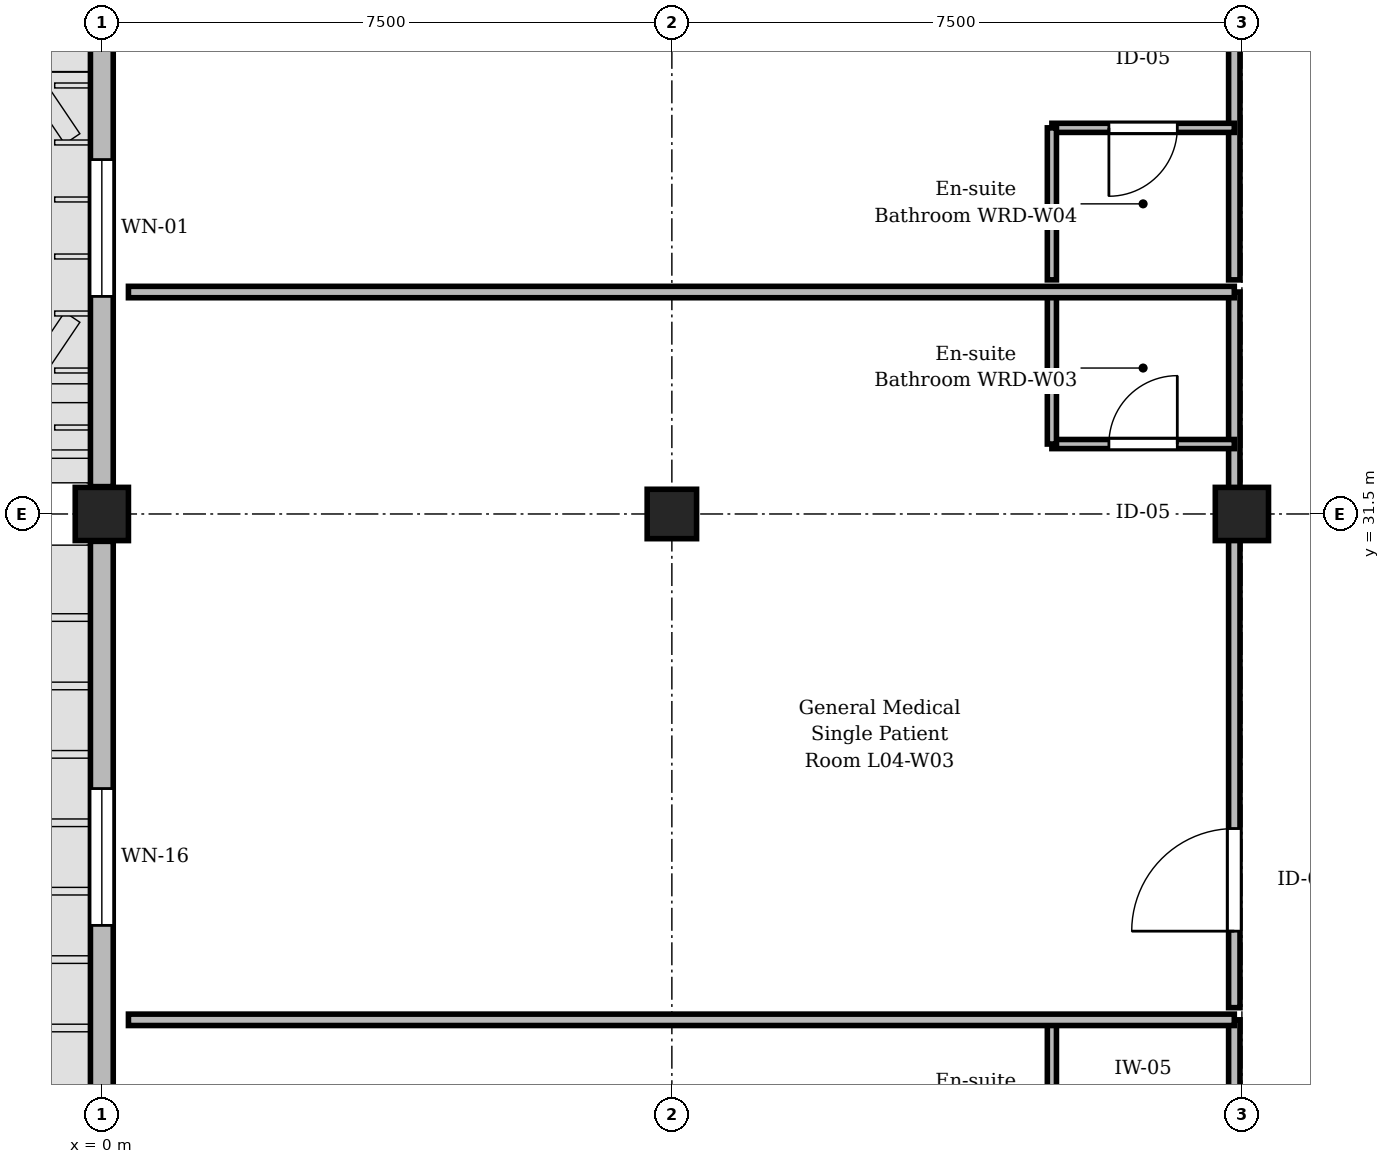
"""IFC4 building model, lengths in metres.
Left out: names, types, materials, properties, quantities, classifications, styles, units other than length and angle.
Written with IfcOpenShell. Run it as: python <this file> out.ifc"""

import sys

from ifc_helpers import new_model, si_unit, direction, frame, frame_2d, origin, origin_2d, place, context, subcontext, project, spatial, rectangle, extrude, element, fill, save


model = new_model("IFC4")
c1 = context("Model", 3, precision=1e-05, world=origin(), true_north=direction((0.0, 1.0)))
c2 = subcontext(c1, "Body", "Model", "MODEL_VIEW")
j1 = project(units=[si_unit("LENGTHUNIT", "METRE"), si_unit("PLANEANGLEUNIT", "RADIAN")], contexts=[c1])
p1 = place(None, origin())
s1 = spatial("IfcSite", under=j1, at=p1, CompositionType="ELEMENT")
p2 = place(p1, origin())
s2 = spatial("IfcBuilding", under=s1, at=p2, CompositionType="ELEMENT")
p3 = place(p2, frame((0.0, 0.0, 17.85)))
s3 = spatial("IfcBuildingStorey", under=s2, at=p3, CompositionType="ELEMENT", Elevation=17.85)
p4 = place(p3, frame((0.0, 31.5, 0.0), z_axis=(0.0, 0.0, 1.0), x_axis=(1.0, 0.0, 0.0)))
e1 = element("IfcColumn", 1, at=p4, inside=s3, PredefinedType="COLUMN", context=c2, shape_type="SweptSolid", body=[
    extrude(rectangle(XDim=0.7, YDim=0.7, at=origin_2d()), origin(), (0.0, 0.0, 1.0), 4.05),
])
p5 = place(p3, frame((7.5, 31.5, 0.0), z_axis=(0.0, 0.0, 1.0), x_axis=(1.0, 0.0, 0.0)))
e2 = element("IfcColumn", 2, at=p5, inside=s3, PredefinedType="COLUMN", context=c2, shape_type="SweptSolid", body=[
    extrude(rectangle(XDim=0.65, YDim=0.65, at=origin_2d()), origin(), (0.0, 0.0, 1.0), 4.05),
])
p6 = place(p3, frame((15.0, 31.5, 0.0), z_axis=(0.0, 0.0, 1.0), x_axis=(1.0, 0.0, 0.0)))
e3 = element("IfcColumn", 3, at=p6, inside=s3, PredefinedType="COLUMN", context=c2, shape_type="SweptSolid", body=[
    extrude(rectangle(XDim=0.7, YDim=0.7, at=origin_2d()), origin(), (0.0, 0.0, 1.0), 4.05),
])
p7 = place(p3, frame((0.0, 22.835, 0.0), z_axis=(0.0, 0.0, 1.0), x_axis=(0.0, 1.0, 0.0)))
e4 = element("IfcWall", 4, at=p7, inside=s3, PredefinedType="STANDARD", context=c2, shape_type="SweptSolid", body=[
    extrude(rectangle(XDim=8.305, YDim=0.3, at=frame_2d((4.152, 0.0))), origin(), (0.0, 0.0, 1.0), 3.22),
])
p8 = place(p7, frame((3.252, 0.0, 0.9)))
e5 = element("IfcOpeningElement", 5, at=p8, cuts=e4, PredefinedType="OPENING", context=c2, shape_type="SweptSolid", body=[
    extrude(rectangle(XDim=1.8, YDim=1.8, at=frame_2d((0.9, 0.9))), frame((0.0, 0.16, 0.0), z_axis=(0.0, -1.0, 0.0), x_axis=(1.0, 0.0, 0.0)), (0.0, 0.0, 1.0), 0.32),
])
p9 = place(p3, frame((0.0, 31.86, 0.0), z_axis=(0.0, 0.0, 1.0), x_axis=(0.0, 1.0, 0.0)))
e6 = element("IfcWall", 6, at=p9, inside=s3, PredefinedType="STANDARD", context=c2, shape_type="SweptSolid", body=[
    extrude(rectangle(XDim=6.805, YDim=0.3, at=frame_2d((3.402, 0.0))), origin(), (0.0, 0.0, 1.0), 3.17),
])
p10 = place(p9, frame((2.502, 0.0, 0.9)))
e7 = element("IfcOpeningElement", 7, at=p10, cuts=e6, PredefinedType="OPENING", context=c2, shape_type="SweptSolid", body=[
    extrude(rectangle(XDim=1.8, YDim=1.99, at=frame_2d((0.9, 0.995))), frame((0.0, 0.16, 0.0), z_axis=(0.0, -1.0, 0.0), x_axis=(1.0, 0.0, 0.0)), (0.0, 0.0, 1.0), 0.32),
])
p11 = place(p3, frame((14.9, 15.43, 0.0), z_axis=(0.0, 0.0, 1.0), x_axis=(0.0, 1.0, 0.0)))
e8 = element("IfcWall", 8, at=p11, inside=s3, PredefinedType="PARTITIONING", context=c2, shape_type="SweptSolid", body=[
    extrude(rectangle(XDim=9.415, YDim=0.15, at=frame_2d((4.708, 0.0))), origin(), (0.0, 0.0, 1.0), 3.055),
])
p12 = place(p11, frame((2.49, 0.0, 0.0)))
e9 = element("IfcOpeningElement", 9, at=p12, cuts=e8, PredefinedType="OPENING", context=c2, shape_type="SweptSolid", body=[
    extrude(rectangle(XDim=1.45, YDim=2.3, at=frame_2d((0.725, 1.15))), frame((0.0, 0.085, 0.0), z_axis=(0.0, -1.0, 0.0), x_axis=(1.0, 0.0, 0.0)), (0.0, 0.0, 1.0), 0.17),
])
p13 = place(p3, frame((12.5, 22.845, 0.0), z_axis=(0.0, 0.0, 1.0), x_axis=(0.0, 1.0, 0.0)))
e10 = element("IfcWall", 10, at=p13, inside=s3, PredefinedType="PARTITIONING", context=c2, shape_type="SweptSolid", body=[
    extrude(rectangle(XDim=2.0, YDim=0.12, at=frame_2d((1.0, 0.0))), origin(), (0.0, 0.0, 1.0), 3.755),
])
p14 = place(p3, frame((14.9, 25.005, 0.0), z_axis=(0.0, 0.0, 1.0), x_axis=(0.0, 1.0, 0.0)))
e11 = element("IfcWall", 11, at=p14, inside=s3, PredefinedType="PARTITIONING", context=c2, shape_type="SweptSolid", body=[
    extrude(rectangle(XDim=9.415, YDim=0.15, at=frame_2d((4.708, 0.0))), origin(), (0.0, 0.0, 1.0), 3.055),
])
p15 = place(p14, frame((1.007, 0.0, 0.0)))
e12 = element("IfcOpeningElement", 12, at=p15, cuts=e11, PredefinedType="OPENING", context=c2, shape_type="SweptSolid", body=[
    extrude(rectangle(XDim=1.35, YDim=2.25, at=frame_2d((0.675, 1.125))), frame((0.0, 0.085, 0.0), z_axis=(0.0, -1.0, 0.0), x_axis=(1.0, 0.0, 0.0)), (0.0, 0.0, 1.0), 0.17),
])
p16 = place(p3, frame((12.5, 32.42, 0.0), z_axis=(0.0, 0.0, 1.0), x_axis=(1.0, 0.0, 0.0)))
e13 = element("IfcWall", 13, at=p16, inside=s3, PredefinedType="PARTITIONING", context=c2, shape_type="SweptSolid", body=[
    extrude(rectangle(XDim=2.4, YDim=0.12, at=frame_2d((1.2, 0.0))), origin(), (0.0, 0.0, 1.0), 3.755),
])
p17 = place(p16, frame((0.75, 0.0, 0.0)))
e14 = element("IfcOpeningElement", 14, at=p17, cuts=e13, PredefinedType="OPENING", context=c2, shape_type="SweptSolid", body=[
    extrude(rectangle(XDim=0.9, YDim=2.1, at=frame_2d((0.45, 1.05))), frame((0.0, 0.07, 0.0), z_axis=(0.0, -1.0, 0.0), x_axis=(1.0, 0.0, 0.0)), (0.0, 0.0, 1.0), 0.14),
])
p18 = place(p3, frame((12.5, 32.42, 0.0), z_axis=(0.0, 0.0, 1.0), x_axis=(0.0, 1.0, 0.0)))
e15 = element("IfcWall", 15, at=p18, inside=s3, PredefinedType="PARTITIONING", context=c2, shape_type="SweptSolid", body=[
    extrude(rectangle(XDim=2.0, YDim=0.12, at=frame_2d((1.0, 0.0))), origin(), (0.0, 0.0, 1.0), 3.755),
])
p19 = place(p3, frame((14.9, 34.58, 0.0), z_axis=(0.0, 0.0, 1.0), x_axis=(0.0, 1.0, 0.0)))
e16 = element("IfcWall", 16, at=p19, inside=s3, PredefinedType="PARTITIONING", context=c2, shape_type="SweptSolid", body=[
    extrude(rectangle(XDim=9.415, YDim=0.15, at=frame_2d((4.708, 0.0))), origin(), (0.0, 0.0, 1.0), 3.205),
])
p20 = place(p19, frame((7.715, 0.0, 0.0)))
e17 = element("IfcOpeningElement", 17, at=p20, cuts=e16, PredefinedType="OPENING", context=c2, shape_type="SweptSolid", body=[
    extrude(rectangle(XDim=1.45, YDim=2.3, at=frame_2d((0.725, 1.15))), frame((0.0, 0.085, 0.0), z_axis=(0.0, -1.0, 0.0), x_axis=(1.0, 0.0, 0.0)), (0.0, 0.0, 1.0), 0.17),
])
p21 = place(p3, frame((14.9, 36.58, 0.0), z_axis=(0.0, 0.0, 1.0), x_axis=(-1.0, 0.0, 0.0)))
e18 = element("IfcWall", 18, at=p21, inside=s3, PredefinedType="PARTITIONING", context=c2, shape_type="SweptSolid", body=[
    extrude(rectangle(XDim=2.4, YDim=0.12, at=frame_2d((1.2, 0.0))), origin(), (0.0, 0.0, 1.0), 3.755),
])
p22 = place(p21, frame((0.75, 0.0, 0.0)))
e19 = element("IfcOpeningElement", 19, at=p22, cuts=e18, PredefinedType="OPENING", context=c2, shape_type="SweptSolid", body=[
    extrude(rectangle(XDim=0.9, YDim=2.1, at=frame_2d((0.45, 1.05))), frame((0.0, 0.07, 0.0), z_axis=(0.0, -1.0, 0.0), x_axis=(1.0, 0.0, 0.0)), (0.0, 0.0, 1.0), 0.14),
])
p23 = place(p3, frame((12.5, 34.58, 0.0), z_axis=(0.0, 0.0, 1.0), x_axis=(0.0, 1.0, 0.0)))
e20 = element("IfcWall", 20, at=p23, inside=s3, PredefinedType="PARTITIONING", context=c2, shape_type="SweptSolid", body=[
    extrude(rectangle(XDim=2.0, YDim=0.12, at=frame_2d((1.0, 0.0))), origin(), (0.0, 0.0, 1.0), 3.755),
])
for number, where, z_axis, x_axis in (
    (21, (0.35, 24.845, 0.0), (0.0, 0.0, 1.0), (1.0, 0.0, 0.0)),
    (22, (0.35, 34.42, 0.0), (0.0, 0.0, 1.0), (1.0, 0.0, 0.0)),
):
    element("IfcWall", number, at=place(p3, frame(where, z_axis=z_axis, x_axis=x_axis)), inside=s3, PredefinedType="PARTITIONING", context=c2, shape_type="SweptSolid", body=[
        extrude(rectangle(XDim=14.55, YDim=0.15, at=frame_2d((7.275, 0.0))), origin(), (0.0, 0.0, 1.0), 3.755),
    ])
p24 = place(p8, origin())
e23 = element("IfcWindow", 23, at=p24, inside=s3, PartitioningType="SINGLE_PANEL", PredefinedType="WINDOW", context=c2, shape_type="SweptSolid", body=[
    extrude(rectangle(XDim=1.8, YDim=1.8, at=frame_2d((0.9, 0.9))), frame((0.0, 0.03, 0.0), z_axis=(0.0, -1.0, 0.0), x_axis=(1.0, 0.0, 0.0)), (0.0, 0.0, 1.0), 0.06),
])
fill(e5, e23)
p25 = place(p10, origin())
e24 = element("IfcWindow", 24, at=p25, inside=s3, PartitioningType="SINGLE_PANEL", PredefinedType="WINDOW", context=c2, shape_type="SweptSolid", body=[
    extrude(rectangle(XDim=1.8, YDim=1.99, at=frame_2d((0.9, 0.995))), frame((0.0, 0.03, 0.0), z_axis=(0.0, -1.0, 0.0), x_axis=(1.0, 0.0, 0.0)), (0.0, 0.0, 1.0), 0.06),
])
fill(e7, e24)
p26 = place(p15, origin())
e25 = element("IfcDoor", 25, at=p26, inside=s3, OperationType="SINGLE_SWING_LEFT", PredefinedType="DOOR", context=c2, shape_type="SweptSolid", body=[
    extrude(rectangle(XDim=1.35, YDim=2.25, at=frame_2d((0.675, 1.125))), frame((0.0, 0.025, 0.0), z_axis=(0.0, -1.0, 0.0), x_axis=(1.0, 0.0, 0.0)), (0.0, 0.0, 1.0), 0.05),
])
fill(e12, e25)
p27 = place(p17, origin())
e26 = element("IfcDoor", 26, at=p27, inside=s3, OperationType="SINGLE_SWING_RIGHT", PredefinedType="DOOR", context=c2, shape_type="SweptSolid", body=[
    extrude(rectangle(XDim=0.9, YDim=2.1, at=frame_2d((0.45, 1.05))), frame((0.0, 0.025, 0.0), z_axis=(0.0, -1.0, 0.0), x_axis=(1.0, 0.0, 0.0)), (0.0, 0.0, 1.0), 0.05),
])
fill(e14, e26)
p28 = place(p22, origin())
e27 = element("IfcDoor", 27, at=p28, inside=s3, OperationType="SINGLE_SWING_RIGHT", PredefinedType="DOOR", context=c2, shape_type="SweptSolid", body=[
    extrude(rectangle(XDim=0.9, YDim=2.1, at=frame_2d((0.45, 1.05))), frame((0.0, 0.025, 0.0), z_axis=(0.0, -1.0, 0.0), x_axis=(1.0, 0.0, 0.0)), (0.0, 0.0, 1.0), 0.05),
])
fill(e19, e27)
save(model, sys.argv[1])
